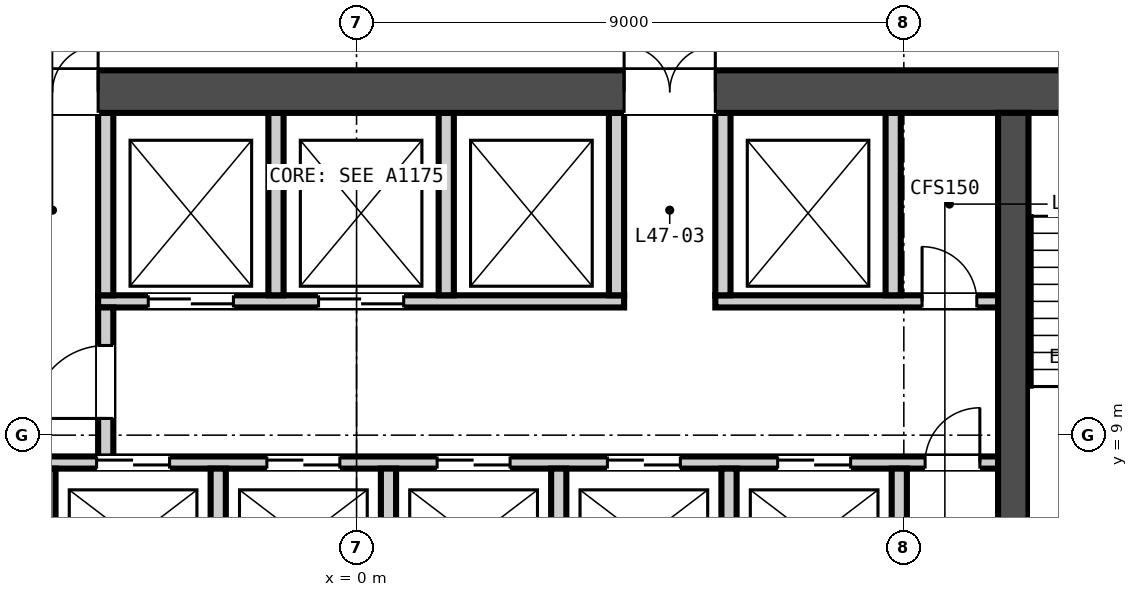
"""IFC4 building model, lengths in metres.
Left out: names, types, materials, properties, quantities, classifications, styles, units other than length and angle.
Written with IfcOpenShell. Run it as: python <this file> out.ifc"""

import sys

from ifc_helpers import new_model, si_unit, direction, frame, frame_2d, origin, place, context, subcontext, project, spatial, rectangle, extrude, element, fill, save


model = new_model("IFC4")
c1 = context("Model", 3, precision=1e-05, world=origin(), true_north=direction((0.0, 1.0)))
c2 = subcontext(c1, "Body", "Model", "MODEL_VIEW")
j1 = project(units=[si_unit("LENGTHUNIT", "METRE"), si_unit("PLANEANGLEUNIT", "RADIAN")], contexts=[c1])
p1 = place(None, origin())
s1 = spatial("IfcSite", under=j1, at=p1, CompositionType="ELEMENT")
p2 = place(p1, origin())
s2 = spatial("IfcBuilding", under=s1, at=p2, CompositionType="ELEMENT")
p3 = place(p2, frame((0.0, 0.0, 189.05)))
s3 = spatial("IfcBuildingStorey", under=s2, at=p3, CompositionType="ELEMENT", Elevation=189.05)
p4 = place(p3, frame((-15.0, 14.65, -0.15), z_axis=(0.0, 0.0, 1.0), x_axis=(1.0, 0.0, 0.0)))
e1 = element("IfcWall", 1, at=p4, inside=s3, PredefinedType="SOLIDWALL", context=c2, shape_type="SweptSolid", body=[
    extrude(rectangle(XDim=30.0, YDim=0.7, at=frame_2d((15.0, 0.0))), origin(), (0.0, 0.0, 1.0), 3.65),
])
p5 = place(p4, frame((9.25, 0.0, 0.15)))
e2 = element("IfcOpeningElement", 2, at=p5, cuts=e1, PredefinedType="OPENING", context=c2, shape_type="SweptSolid", body=[
    extrude(rectangle(XDim=1.5, YDim=2.1, at=frame_2d((0.75, 1.05))), frame((0.0, 0.36, 0.0), z_axis=(0.0, -1.0, 0.0), x_axis=(1.0, 0.0, 0.0)), (0.0, 0.0, 1.0), 0.72),
])
p6 = place(p4, frame((19.4, 0.0, 0.15)))
e3 = element("IfcOpeningElement", 3, at=p6, cuts=e1, PredefinedType="OPENING", context=c2, shape_type="SweptSolid", body=[
    extrude(rectangle(XDim=1.5, YDim=2.1, at=frame_2d((0.75, 1.05))), frame((0.0, 0.36, 0.0), z_axis=(0.0, -1.0, 0.0), x_axis=(1.0, 0.0, 0.0)), (0.0, 0.0, 1.0), 0.72),
])
p7 = place(p4, frame((1.5, 0.0, 0.15)))
e4 = element("IfcOpeningElement", 4, at=p7, cuts=e1, PredefinedType="OPENING", context=c2, shape_type="SweptSolid", body=[
    extrude(rectangle(XDim=1.2, YDim=2.1, at=frame_2d((0.6, 1.05))), frame((0.0, 0.36, 0.0), z_axis=(0.0, -1.0, 0.0), x_axis=(1.0, 0.0, 0.0)), (0.0, 0.0, 1.0), 0.72),
])
p8 = place(p4, frame((27.3, 0.0, 0.15)))
e5 = element("IfcOpeningElement", 5, at=p8, cuts=e1, PredefinedType="OPENING", context=c2, shape_type="SweptSolid", body=[
    extrude(rectangle(XDim=1.2, YDim=2.1, at=frame_2d((0.6, 1.05))), frame((0.0, 0.36, 0.0), z_axis=(0.0, -1.0, 0.0), x_axis=(1.0, 0.0, 0.0)), (0.0, 0.0, 1.0), 0.72),
])
p9 = place(p3, frame((10.8, 0.7, -0.15), z_axis=(0.0, 0.0, 1.0), x_axis=(0.0, 1.0, 0.0)))
e6 = element("IfcWall", 6, at=p9, inside=s3, PredefinedType="SOLIDWALL", context=c2, shape_type="SweptSolid", body=[
    extrude(rectangle(XDim=13.6, YDim=0.5, at=frame_2d((6.8, 0.0))), origin(), (0.0, 0.0, 1.0), 3.65),
])
p10 = place(p3, frame((-10.55, 8.55, 0.0), z_axis=(0.0, 0.0, 1.0), x_axis=(1.0, 0.0, 0.0)))
e7 = element("IfcWall", 7, at=p10, inside=s3, PredefinedType="PARTITIONING", context=c2, shape_type="SweptSolid", body=[
    extrude(rectangle(XDim=21.1, YDim=0.2, at=frame_2d((10.55, 0.0))), origin(), (0.0, 0.0, 1.0), 3.5),
])
p11 = place(p10, frame((0.675, 0.0, 0.0)))
e8 = element("IfcOpeningElement", 8, at=p11, cuts=e7, PredefinedType="OPENING", context=c2, shape_type="SweptSolid", body=[
    extrude(rectangle(XDim=1.2, YDim=2.1, at=frame_2d((0.6, 1.05))), frame((0.0, 0.11, 0.0), z_axis=(0.0, -1.0, 0.0), x_axis=(1.0, 0.0, 0.0)), (0.0, 0.0, 1.0), 0.22),
])
p12 = place(p10, frame((3.475, 0.0, 0.0)))
e9 = element("IfcOpeningElement", 9, at=p12, cuts=e7, PredefinedType="OPENING", context=c2, shape_type="SweptSolid", body=[
    extrude(rectangle(XDim=1.2, YDim=2.1, at=frame_2d((0.6, 1.05))), frame((0.0, 0.11, 0.0), z_axis=(0.0, -1.0, 0.0), x_axis=(1.0, 0.0, 0.0)), (0.0, 0.0, 1.0), 0.22),
])
p13 = place(p10, frame((6.275, 0.0, 0.0)))
e10 = element("IfcOpeningElement", 10, at=p13, cuts=e7, PredefinedType="OPENING", context=c2, shape_type="SweptSolid", body=[
    extrude(rectangle(XDim=1.2, YDim=2.1, at=frame_2d((0.6, 1.05))), frame((0.0, 0.11, 0.0), z_axis=(0.0, -1.0, 0.0), x_axis=(1.0, 0.0, 0.0)), (0.0, 0.0, 1.0), 0.22),
])
p14 = place(p10, frame((9.075, 0.0, 0.0)))
e11 = element("IfcOpeningElement", 11, at=p14, cuts=e7, PredefinedType="OPENING", context=c2, shape_type="SweptSolid", body=[
    extrude(rectangle(XDim=1.2, YDim=2.1, at=frame_2d((0.6, 1.05))), frame((0.0, 0.11, 0.0), z_axis=(0.0, -1.0, 0.0), x_axis=(1.0, 0.0, 0.0)), (0.0, 0.0, 1.0), 0.22),
])
p15 = place(p10, frame((11.875, 0.0, 0.0)))
e12 = element("IfcOpeningElement", 12, at=p15, cuts=e7, PredefinedType="OPENING", context=c2, shape_type="SweptSolid", body=[
    extrude(rectangle(XDim=1.2, YDim=2.1, at=frame_2d((0.6, 1.05))), frame((0.0, 0.11, 0.0), z_axis=(0.0, -1.0, 0.0), x_axis=(1.0, 0.0, 0.0)), (0.0, 0.0, 1.0), 0.22),
])
p16 = place(p10, frame((14.675, 0.0, 0.0)))
e13 = element("IfcOpeningElement", 13, at=p16, cuts=e7, PredefinedType="OPENING", context=c2, shape_type="SweptSolid", body=[
    extrude(rectangle(XDim=1.2, YDim=2.1, at=frame_2d((0.6, 1.05))), frame((0.0, 0.11, 0.0), z_axis=(0.0, -1.0, 0.0), x_axis=(1.0, 0.0, 0.0)), (0.0, 0.0, 1.0), 0.22),
])
p17 = place(p10, frame((17.475, 0.0, 0.0)))
e14 = element("IfcOpeningElement", 14, at=p17, cuts=e7, PredefinedType="OPENING", context=c2, shape_type="SweptSolid", body=[
    extrude(rectangle(XDim=1.2, YDim=2.1, at=frame_2d((0.6, 1.05))), frame((0.0, 0.11, 0.0), z_axis=(0.0, -1.0, 0.0), x_axis=(1.0, 0.0, 0.0)), (0.0, 0.0, 1.0), 0.22),
])
p18 = place(p10, frame((19.9, 0.0, 0.0)))
e15 = element("IfcOpeningElement", 15, at=p18, cuts=e7, PredefinedType="OPENING", context=c2, shape_type="SweptSolid", body=[
    extrude(rectangle(XDim=0.9, YDim=2.1, at=frame_2d((0.45, 1.05))), frame((0.0, 0.11, 0.0), z_axis=(0.0, -1.0, 0.0), x_axis=(1.0, 0.0, 0.0)), (0.0, 0.0, 1.0), 0.22),
])
p19 = place(p3, frame((-4.25, 11.2, 0.0), z_axis=(0.0, 0.0, 1.0), x_axis=(1.0, 0.0, 0.0)))
e16 = element("IfcWall", 16, at=p19, inside=s3, PredefinedType="PARTITIONING", context=c2, shape_type="SweptSolid", body=[
    extrude(rectangle(XDim=8.65, YDim=0.2, at=frame_2d((4.325, 0.0))), origin(), (0.0, 0.0, 1.0), 3.5),
])
p20 = place(p19, frame((0.825, 0.0, 0.0)))
e17 = element("IfcOpeningElement", 17, at=p20, cuts=e16, PredefinedType="OPENING", context=c2, shape_type="SweptSolid", body=[
    extrude(rectangle(XDim=1.4, YDim=2.1, at=frame_2d((0.7, 1.05))), frame((0.0, 0.11, 0.0), z_axis=(0.0, -1.0, 0.0), x_axis=(1.0, 0.0, 0.0)), (0.0, 0.0, 1.0), 0.22),
])
p21 = place(p19, frame((3.625, 0.0, 0.0)))
e18 = element("IfcOpeningElement", 18, at=p21, cuts=e16, PredefinedType="OPENING", context=c2, shape_type="SweptSolid", body=[
    extrude(rectangle(XDim=1.4, YDim=2.1, at=frame_2d((0.7, 1.05))), frame((0.0, 0.11, 0.0), z_axis=(0.0, -1.0, 0.0), x_axis=(1.0, 0.0, 0.0)), (0.0, 0.0, 1.0), 0.22),
])
p22 = place(p3, frame((5.9, 11.2, 0.0), z_axis=(0.0, 0.0, 1.0), x_axis=(1.0, 0.0, 0.0)))
e19 = element("IfcWall", 19, at=p22, inside=s3, PredefinedType="PARTITIONING", context=c2, shape_type="SweptSolid", body=[
    extrude(rectangle(XDim=4.65, YDim=0.2, at=frame_2d((2.325, 0.0))), origin(), (0.0, 0.0, 1.0), 3.5),
])
p23 = place(p22, frame((3.4, 0.0, 0.0)))
e20 = element("IfcOpeningElement", 20, at=p23, cuts=e19, PredefinedType="OPENING", context=c2, shape_type="SweptSolid", body=[
    extrude(rectangle(XDim=0.9, YDim=2.1, at=frame_2d((0.45, 1.05))), frame((0.0, 0.11, 0.0), z_axis=(0.0, -1.0, 0.0), x_axis=(1.0, 0.0, 0.0)), (0.0, 0.0, 1.0), 0.22),
])
p24 = place(p3, frame((-4.125, 8.65, 0.0), z_axis=(0.0, 0.0, 1.0), x_axis=(0.0, 1.0, 0.0)))
e21 = element("IfcWall", 21, at=p24, inside=s3, PredefinedType="PARTITIONING", context=c2, shape_type="SweptSolid", body=[
    extrude(rectangle(XDim=2.45, YDim=0.25, at=frame_2d((1.225, 0.0))), origin(), (0.0, 0.0, 1.0), 3.5),
])
p25 = place(p24, frame((0.625, 0.0, 0.0)))
e22 = element("IfcOpeningElement", 22, at=p25, cuts=e21, PredefinedType="OPENING", context=c2, shape_type="SweptSolid", body=[
    extrude(rectangle(XDim=1.2, YDim=2.1, at=frame_2d((0.6, 1.05))), frame((0.0, 0.135, 0.0), z_axis=(0.0, -1.0, 0.0), x_axis=(1.0, 0.0, 0.0)), (0.0, 0.0, 1.0), 0.27),
])
for number, where, z_axis, x_axis in (
    (23, (-5.075, 6.15, 0.0), (0.0, 0.0, 1.0), (0.0, 1.0, 0.0)),
    (24, (-2.275, 6.15, 0.0), (0.0, 0.0, 1.0), (0.0, 1.0, 0.0)),
    (25, (0.525, 6.15, 0.0), (0.0, 0.0, 1.0), (0.0, 1.0, 0.0)),
    (26, (3.325, 6.15, 0.0), (0.0, 0.0, 1.0), (0.0, 1.0, 0.0)),
    (27, (6.125, 6.15, 0.0), (0.0, 0.0, 1.0), (0.0, 1.0, 0.0)),
    (28, (8.925, 6.15, 0.0), (0.0, 0.0, 1.0), (0.0, 1.0, 0.0)),
):
    element("IfcWall", number, at=place(p3, frame(where, z_axis=z_axis, x_axis=x_axis)), inside=s3, PredefinedType="PARTITIONING", context=c2, shape_type="SweptSolid", body=[
        extrude(rectangle(XDim=2.3, YDim=0.25, at=frame_2d((1.15, 0.0))), origin(), (0.0, 0.0, 1.0), 3.5),
    ])
for number, where, z_axis, x_axis in (
    (29, (-4.125, 11.3, 0.0), (0.0, 0.0, 1.0), (0.0, 1.0, 0.0)),
    (30, (-1.325, 11.3, 0.0), (0.0, 0.0, 1.0), (0.0, 1.0, 0.0)),
    (31, (1.475, 11.3, 0.0), (0.0, 0.0, 1.0), (0.0, 1.0, 0.0)),
    (32, (4.275, 11.3, 0.0), (0.0, 0.0, 1.0), (0.0, 1.0, 0.0)),
    (33, (6.025, 11.3, 0.0), (0.0, 0.0, 1.0), (0.0, 1.0, 0.0)),
    (34, (8.825, 11.3, 0.0), (0.0, 0.0, 1.0), (0.0, 1.0, 0.0)),
):
    element("IfcWall", number, at=place(p3, frame(where, z_axis=z_axis, x_axis=x_axis)), inside=s3, PredefinedType="PARTITIONING", context=c2, shape_type="SweptSolid", body=[
        extrude(rectangle(XDim=3.0, YDim=0.25, at=frame_2d((1.5, 0.0))), origin(), (0.0, 0.0, 1.0), 3.5),
    ])
p26 = place(p25, origin())
e35 = element("IfcDoor", 35, at=p26, inside=s3, OperationType="SINGLE_SWING_LEFT", PredefinedType="DOOR", context=c2, shape_type="SweptSolid", body=[
    extrude(rectangle(XDim=1.2, YDim=2.1, at=frame_2d((0.6, 1.05))), frame((0.0, 0.025, 0.0), z_axis=(0.0, -1.0, 0.0), x_axis=(1.0, 0.0, 0.0)), (0.0, 0.0, 1.0), 0.05),
])
fill(e22, e35)
p27 = place(p13, origin())
e36 = element("IfcDoor", 36, at=p27, inside=s3, OperationType="DOUBLE_DOOR_SLIDING", PredefinedType="DOOR", context=c2, shape_type="SweptSolid", body=[
    extrude(rectangle(XDim=1.2, YDim=2.1, at=frame_2d((0.6, 1.05))), frame((0.0, 0.025, 0.0), z_axis=(0.0, -1.0, 0.0), x_axis=(1.0, 0.0, 0.0)), (0.0, 0.0, 1.0), 0.05),
])
fill(e10, e36)
p28 = place(p14, origin())
e37 = element("IfcDoor", 37, at=p28, inside=s3, OperationType="DOUBLE_DOOR_SLIDING", PredefinedType="DOOR", context=c2, shape_type="SweptSolid", body=[
    extrude(rectangle(XDim=1.2, YDim=2.1, at=frame_2d((0.6, 1.05))), frame((0.0, 0.025, 0.0), z_axis=(0.0, -1.0, 0.0), x_axis=(1.0, 0.0, 0.0)), (0.0, 0.0, 1.0), 0.05),
])
fill(e11, e37)
p29 = place(p15, origin())
e38 = element("IfcDoor", 38, at=p29, inside=s3, OperationType="DOUBLE_DOOR_SLIDING", PredefinedType="DOOR", context=c2, shape_type="SweptSolid", body=[
    extrude(rectangle(XDim=1.2, YDim=2.1, at=frame_2d((0.6, 1.05))), frame((0.0, 0.025, 0.0), z_axis=(0.0, -1.0, 0.0), x_axis=(1.0, 0.0, 0.0)), (0.0, 0.0, 1.0), 0.05),
])
fill(e12, e38)
p30 = place(p16, origin())
e39 = element("IfcDoor", 39, at=p30, inside=s3, OperationType="DOUBLE_DOOR_SLIDING", PredefinedType="DOOR", context=c2, shape_type="SweptSolid", body=[
    extrude(rectangle(XDim=1.2, YDim=2.1, at=frame_2d((0.6, 1.05))), frame((0.0, 0.025, 0.0), z_axis=(0.0, -1.0, 0.0), x_axis=(1.0, 0.0, 0.0)), (0.0, 0.0, 1.0), 0.05),
])
fill(e13, e39)
p31 = place(p17, origin())
e40 = element("IfcDoor", 40, at=p31, inside=s3, OperationType="DOUBLE_DOOR_SLIDING", PredefinedType="DOOR", context=c2, shape_type="SweptSolid", body=[
    extrude(rectangle(XDim=1.2, YDim=2.1, at=frame_2d((0.6, 1.05))), frame((0.0, 0.025, 0.0), z_axis=(0.0, -1.0, 0.0), x_axis=(1.0, 0.0, 0.0)), (0.0, 0.0, 1.0), 0.05),
])
fill(e14, e40)
p32 = place(p18, origin())
e41 = element("IfcDoor", 41, at=p32, inside=s3, OperationType="SINGLE_SWING_RIGHT", PredefinedType="DOOR", context=c2, shape_type="SweptSolid", body=[
    extrude(rectangle(XDim=0.9, YDim=2.1, at=frame_2d((0.45, 1.05))), frame((0.0, 0.025, 0.0), z_axis=(0.0, -1.0, 0.0), x_axis=(1.0, 0.0, 0.0)), (0.0, 0.0, 1.0), 0.05),
])
fill(e15, e41)
p33 = place(p20, origin())
e42 = element("IfcDoor", 42, at=p33, inside=s3, OperationType="DOUBLE_DOOR_SLIDING", PredefinedType="DOOR", context=c2, shape_type="SweptSolid", body=[
    extrude(rectangle(XDim=1.4, YDim=2.1, at=frame_2d((0.7, 1.05))), frame((0.0, 0.025, 0.0), z_axis=(0.0, -1.0, 0.0), x_axis=(1.0, 0.0, 0.0)), (0.0, 0.0, 1.0), 0.05),
])
fill(e17, e42)
p34 = place(p21, origin())
e43 = element("IfcDoor", 43, at=p34, inside=s3, OperationType="DOUBLE_DOOR_SLIDING", PredefinedType="DOOR", context=c2, shape_type="SweptSolid", body=[
    extrude(rectangle(XDim=1.4, YDim=2.1, at=frame_2d((0.7, 1.05))), frame((0.0, 0.025, 0.0), z_axis=(0.0, -1.0, 0.0), x_axis=(1.0, 0.0, 0.0)), (0.0, 0.0, 1.0), 0.05),
])
fill(e18, e43)
p35 = place(p23, origin())
e44 = element("IfcDoor", 44, at=p35, inside=s3, OperationType="SINGLE_SWING_LEFT", PredefinedType="DOOR", context=c2, shape_type="SweptSolid", body=[
    extrude(rectangle(XDim=0.9, YDim=2.1, at=frame_2d((0.45, 1.05))), frame((0.0, 0.025, 0.0), z_axis=(0.0, -1.0, 0.0), x_axis=(1.0, 0.0, 0.0)), (0.0, 0.0, 1.0), 0.05),
])
fill(e20, e44)
p36 = place(p5, origin())
e45 = element("IfcDoor", 45, at=p36, inside=s3, OperationType="DOUBLE_DOOR_SINGLE_SWING", PredefinedType="DOOR", context=c2, shape_type="SweptSolid", body=[
    extrude(rectangle(XDim=1.5, YDim=2.1, at=frame_2d((0.75, 1.05))), frame((0.0, 0.025, 0.0), z_axis=(0.0, -1.0, 0.0), x_axis=(1.0, 0.0, 0.0)), (0.0, 0.0, 1.0), 0.05),
])
fill(e2, e45)
p37 = place(p6, origin())
e46 = element("IfcDoor", 46, at=p37, inside=s3, OperationType="DOUBLE_DOOR_SINGLE_SWING", PredefinedType="DOOR", context=c2, shape_type="SweptSolid", body=[
    extrude(rectangle(XDim=1.5, YDim=2.1, at=frame_2d((0.75, 1.05))), frame((0.0, 0.025, 0.0), z_axis=(0.0, -1.0, 0.0), x_axis=(1.0, 0.0, 0.0)), (0.0, 0.0, 1.0), 0.05),
])
fill(e3, e46)
save(model, sys.argv[1])
